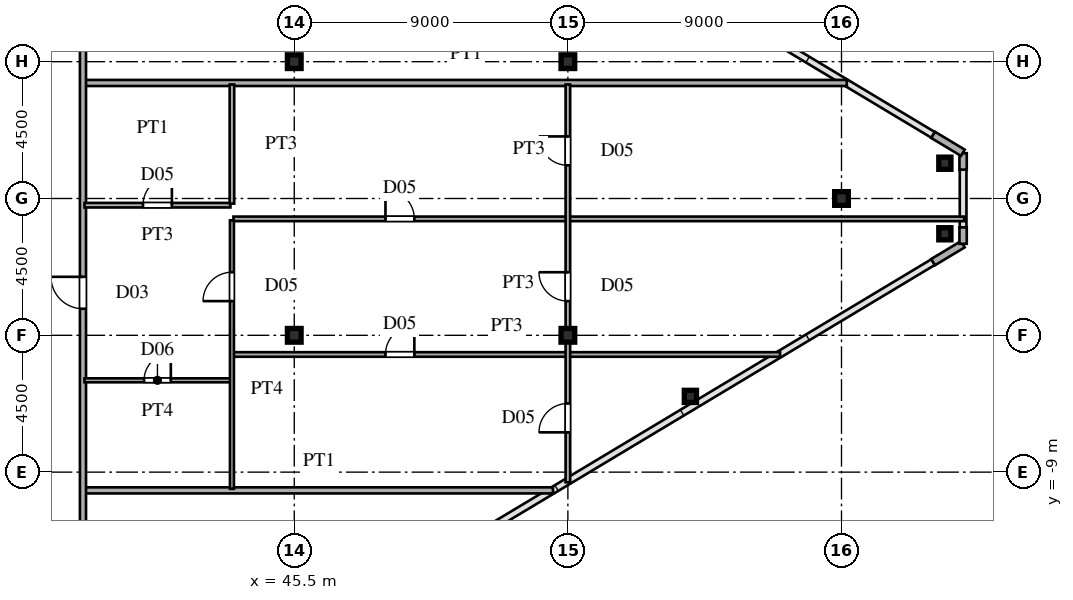
"""IFC4 building model, lengths in metres.
Left out: names, types, materials, properties, quantities, classifications, styles, units other than length and angle.
Written with IfcOpenShell. Run it as: python <this file> out.ifc"""

import sys

from ifc_helpers import new_model, si_unit, direction, frame, frame_2d, origin, origin_2d, place, context, subcontext, project, spatial, rectangle, hollow_rectangle, i_section, extrude, source, transform, mapped, element, fill, save


model = new_model("IFC4")
c1 = context("Model", 3, precision=1e-05, world=origin(), true_north=direction((0.0, 1.0)))
c2 = subcontext(c1, "Body", "Model", "MODEL_VIEW")
j1 = project(units=[si_unit("LENGTHUNIT", "METRE"), si_unit("PLANEANGLEUNIT", "RADIAN")], contexts=[c1])
p1 = place(None, origin())
s1 = spatial("IfcSite", under=j1, at=p1, CompositionType="ELEMENT")
p2 = place(p1, origin())
s2 = spatial("IfcBuilding", under=s1, at=p2, CompositionType="ELEMENT")
p3 = place(p2, frame((0.0, 0.0, 265.65)))
s3 = spatial("IfcBuildingStorey", under=s2, at=p3, CompositionType="ELEMENT", Elevation=265.65)
m1 = source(origin(), c2, "Body", "SweptSolid", [
    extrude(i_section(OverallWidth=0.45, OverallDepth=0.45, WebThickness=0.016, FlangeThickness=0.025, at=origin_2d()), origin(), (0.0, 0.0, 1.0), 3.75),
])
for number, where, z_axis, x_axis in (
    (1, (45.5, -4.5, 0.0), (0.0, 0.0, 1.0), (1.0, 0.0, 0.0)),
    (2, (45.5, 4.5, 0.0), (0.0, 0.0, 1.0), (1.0, 0.0, 0.0)),
    (3, (54.5, -4.5, 0.0), (0.0, 0.0, 1.0), (1.0, 0.0, 0.0)),
    (4, (54.5, 4.5, 0.0), (0.0, 0.0, 1.0), (1.0, 0.0, 0.0)),
    (5, (63.5, 0.0, 0.0), (0.0, 0.0, 1.0), (1.0, 0.0, 0.0)),
):
    element("IfcColumn", number, at=place(p3, frame(where, z_axis=z_axis, x_axis=x_axis)), inside=s3, PredefinedType="COLUMN", context=c2, shape_type="MappedRepresentation", body=[
        mapped(m1, transform((0.0, 0.0, 0.0), scale=1.0)),
    ])
m2 = source(origin(), c2, "Body", "SweptSolid", [
    extrude(hollow_rectangle(XDim=0.4, YDim=0.4, WallThickness=0.016, at=origin_2d()), origin(), (0.0, 0.0, 1.0), 3.75),
])
for number, where, z_axis, x_axis in (
    (6, (66.9, -1.16, 0.0), (0.0, 0.0, 1.0), (1.0, 0.0, 0.0)),
    (7, (66.9, 1.16, 0.0), (0.0, 0.0, 1.0), (1.0, 0.0, 0.0)),
    (8, (58.53, -6.509, 0.0), (0.0, 0.0, 1.0), (1.0, 0.0, 0.0)),
):
    element("IfcColumn", number, at=place(p3, frame(where, z_axis=z_axis, x_axis=x_axis)), inside=s3, PredefinedType="COLUMN", context=c2, shape_type="MappedRepresentation", body=[
        mapped(m2, transform((0.0, 0.0, 0.0), scale=1.0)),
    ])
p4 = place(p3, frame((66.514, -2.092, 0.0), z_axis=(0.0, 0.0, 1.0), x_axis=(0.85743623509, 0.514590228002, 0.0)))
e9 = element("IfcWall", 9, at=p4, inside=s3, PredefinedType="SOLIDWALL", context=c2, shape_type="SweptSolid", body=[
    extrude(rectangle(XDim=1.14, YDim=0.24, at=frame_2d((0.57, 0.0))), origin(), (0.0, 0.0, 1.0), 3.49),
])
for number, where, z_axis, x_axis in (
    (10, (67.5, -1.49, 0.0), (0.0, 0.0, 1.0), (0.0, 1.0, 0.0)),
    (11, (67.5, 0.95, 0.0), (0.0, 0.0, 1.0), (0.0, 1.0, 0.0)),
):
    element("IfcWall", number, at=place(p3, frame(where, z_axis=z_axis, x_axis=x_axis)), inside=s3, PredefinedType="SOLIDWALL", context=c2, shape_type="SweptSolid", body=[
        extrude(rectangle(XDim=0.54, YDim=0.24, at=frame_2d((0.27, 0.0))), origin(), (0.0, 0.0, 1.0), 3.49),
    ])
p5 = place(p3, frame((67.491, 1.505, 0.0), z_axis=(0.0, 0.0, 1.0), x_axis=(-0.85743623509, 0.514590228002, 0.0)))
e12 = element("IfcWall", 12, at=p5, inside=s3, PredefinedType="SOLIDWALL", context=c2, shape_type="SweptSolid", body=[
    extrude(rectangle(XDim=1.14, YDim=0.24, at=frame_2d((0.57, 0.0))), origin(), (0.0, 0.0, 1.0), 3.49),
])
p6 = place(p3, frame((38.63, -9.6, 0.0), z_axis=(0.0, 0.0, 1.0), x_axis=(1.0, 0.0, 0.0)))
e13 = element("IfcWall", 13, at=p6, inside=s3, PredefinedType="PARTITIONING", context=c2, shape_type="SweptSolid", body=[
    extrude(rectangle(XDim=15.38, YDim=0.2, at=frame_2d((7.69, 0.0))), origin(), (0.0, 0.0, 1.0), 3.49),
])
p7 = place(p3, frame((38.6, -5.98, 0.0), z_axis=(0.0, 0.0, 1.0), x_axis=(1.0, 0.0, 0.0)))
e14 = element("IfcWall", 14, at=p7, inside=s3, PredefinedType="PARTITIONING", context=c2, shape_type="SweptSolid", body=[
    extrude(rectangle(XDim=4.8, YDim=0.13, at=frame_2d((2.4, 0.0))), origin(), (0.0, 0.0, 1.0), 3.49),
])
p8 = place(p7, frame((1.96, 0.0, 0.0)))
e15 = element("IfcOpeningElement", 15, at=p8, cuts=e14, PredefinedType="OPENING", context=c2, shape_type="SweptSolid", body=[
    extrude(rectangle(XDim=0.88, YDim=2.1, at=frame_2d((0.44, 1.05))), frame((0.0, 0.075, 0.0), z_axis=(0.0, -1.0, 0.0), x_axis=(1.0, 0.0, 0.0)), (0.0, 0.0, 1.0), 0.15),
])
p9 = place(p3, frame((43.5, -5.13, 0.0), z_axis=(0.0, 0.0, 1.0), x_axis=(1.0, 0.0, 0.0)))
e16 = element("IfcWall", 16, at=p9, inside=s3, PredefinedType="PARTITIONING", context=c2, shape_type="SweptSolid", body=[
    extrude(rectangle(XDim=17.98, YDim=0.15, at=frame_2d((8.99, 0.0))), origin(), (0.0, 0.0, 1.0), 3.49),
])
p10 = place(p9, frame((5.0, 0.0, 0.0)))
e17 = element("IfcOpeningElement", 17, at=p10, cuts=e16, PredefinedType="OPENING", context=c2, shape_type="SweptSolid", body=[
    extrude(rectangle(XDim=0.95, YDim=2.15, at=frame_2d((0.475, 1.075))), frame((0.0, 0.085, 0.0), z_axis=(0.0, -1.0, 0.0), x_axis=(1.0, 0.0, 0.0)), (0.0, 0.0, 1.0), 0.17),
])
p11 = place(p3, frame((43.5, -0.67, 0.0), z_axis=(0.0, 0.0, 1.0), x_axis=(1.0, 0.0, 0.0)))
e18 = element("IfcWall", 18, at=p11, inside=s3, PredefinedType="PARTITIONING", context=c2, shape_type="SweptSolid", body=[
    extrude(rectangle(XDim=24.035, YDim=0.15, at=frame_2d((12.018, 0.0))), origin(), (0.0, 0.0, 1.0), 3.49),
])
p12 = place(p11, frame((5.0, 0.0, 0.0)))
e19 = element("IfcOpeningElement", 19, at=p12, cuts=e18, PredefinedType="OPENING", context=c2, shape_type="SweptSolid", body=[
    extrude(rectangle(XDim=0.95, YDim=2.15, at=frame_2d((0.475, 1.075))), frame((0.0, 0.085, 0.0), z_axis=(0.0, -1.0, 0.0), x_axis=(1.0, 0.0, 0.0)), (0.0, 0.0, 1.0), 0.17),
])
p13 = place(p3, frame((38.6, -0.22, 0.0), z_axis=(0.0, 0.0, 1.0), x_axis=(1.0, 0.0, 0.0)))
e20 = element("IfcWall", 20, at=p13, inside=s3, PredefinedType="PARTITIONING", context=c2, shape_type="SweptSolid", body=[
    extrude(rectangle(XDim=4.8, YDim=0.15, at=frame_2d((2.4, 0.0))), origin(), (0.0, 0.0, 1.0), 3.49),
])
p14 = place(p13, frame((1.925, 0.0, 0.0)))
e21 = element("IfcOpeningElement", 21, at=p14, cuts=e20, PredefinedType="OPENING", context=c2, shape_type="SweptSolid", body=[
    extrude(rectangle(XDim=0.95, YDim=2.15, at=frame_2d((0.475, 1.075))), frame((0.0, 0.085, 0.0), z_axis=(0.0, -1.0, 0.0), x_axis=(1.0, 0.0, 0.0)), (0.0, 0.0, 1.0), 0.17),
])
p15 = place(p3, frame((38.63, 3.8, 0.0), z_axis=(0.0, 0.0, 1.0), x_axis=(1.0, 0.0, 0.0)))
e22 = element("IfcWall", 22, at=p15, inside=s3, PredefinedType="PARTITIONING", context=c2, shape_type="SweptSolid", body=[
    extrude(rectangle(XDim=25.046, YDim=0.2, at=frame_2d((12.523, 0.0))), origin(), (0.0, 0.0, 1.0), 3.49),
])
p16 = place(p3, frame((38.55, -15.515, 0.0), z_axis=(0.0, 0.0, 1.0), x_axis=(0.0, 1.0, 0.0)))
e23 = element("IfcWall", 23, at=p16, inside=s3, PredefinedType="PARTITIONING", context=c2, shape_type="SweptSolid", body=[
    extrude(rectangle(XDim=31.03, YDim=0.2, at=frame_2d((15.515, 0.0))), origin(), (0.0, 0.0, 1.0), 3.49),
])
p17 = place(p16, frame((2.39, 0.0, 0.0)))
e24 = element("IfcOpeningElement", 24, at=p17, cuts=e23, PredefinedType="OPENING", context=c2, shape_type="SweptSolid", body=[
    extrude(rectangle(XDim=1.05, YDim=2.25, at=frame_2d((0.525, 1.125))), frame((0.0, 0.11, 0.0), z_axis=(0.0, -1.0, 0.0), x_axis=(1.0, 0.0, 0.0)), (0.0, 0.0, 1.0), 0.22),
])
p18 = place(p16, frame((11.889, 0.0, 0.0)))
e25 = element("IfcOpeningElement", 25, at=p18, cuts=e23, PredefinedType="OPENING", context=c2, shape_type="SweptSolid", body=[
    extrude(rectangle(XDim=1.05, YDim=2.25, at=frame_2d((0.525, 1.125))), frame((0.0, 0.11, 0.0), z_axis=(0.0, -1.0, 0.0), x_axis=(1.0, 0.0, 0.0)), (0.0, 0.0, 1.0), 0.22),
])
p19 = place(p16, frame((24.69, 0.0, 0.0)))
e26 = element("IfcOpeningElement", 26, at=p19, cuts=e23, PredefinedType="OPENING", context=c2, shape_type="SweptSolid", body=[
    extrude(rectangle(XDim=1.05, YDim=2.25, at=frame_2d((0.525, 1.125))), frame((0.0, 0.11, 0.0), z_axis=(0.0, -1.0, 0.0), x_axis=(1.0, 0.0, 0.0)), (0.0, 0.0, 1.0), 0.22),
])
p20 = place(p3, frame((43.45, -9.55, 0.0), z_axis=(0.0, 0.0, 1.0), x_axis=(0.0, 1.0, 0.0)))
e27 = element("IfcWall", 27, at=p20, inside=s3, PredefinedType="PARTITIONING", context=c2, shape_type="SweptSolid", body=[
    extrude(rectangle(XDim=8.833, YDim=0.13, at=frame_2d((4.417, 0.0))), origin(), (0.0, 0.0, 1.0), 3.49),
])
p21 = place(p20, frame((6.175, 0.0, 0.0)))
e28 = element("IfcOpeningElement", 28, at=p21, cuts=e27, PredefinedType="OPENING", context=c2, shape_type="SweptSolid", body=[
    extrude(rectangle(XDim=0.95, YDim=2.15, at=frame_2d((0.475, 1.075))), frame((0.0, 0.075, 0.0), z_axis=(0.0, -1.0, 0.0), x_axis=(1.0, 0.0, 0.0)), (0.0, 0.0, 1.0), 0.15),
])
p22 = place(p3, frame((43.45, -0.168, 0.0), z_axis=(0.0, 0.0, 1.0), x_axis=(0.0, 1.0, 0.0)))
e29 = element("IfcWall", 29, at=p22, inside=s3, PredefinedType="PARTITIONING", context=c2, shape_type="SweptSolid", body=[
    extrude(rectangle(XDim=3.918, YDim=0.15, at=frame_2d((1.959, 0.0))), origin(), (0.0, 0.0, 1.0), 3.49),
])
p23 = place(p3, frame((54.5, -9.335, 0.0), z_axis=(0.0, 0.0, 1.0), x_axis=(0.0, 1.0, 0.0)))
e30 = element("IfcWall", 30, at=p23, inside=s3, PredefinedType="PARTITIONING", context=c2, shape_type="SweptSolid", body=[
    extrude(rectangle(XDim=13.085, YDim=0.15, at=frame_2d((6.542, 0.0))), origin(), (0.0, 0.0, 1.0), 2.89),
])
p24 = place(p23, frame((5.96, 0.0, 0.0)))
e31 = element("IfcOpeningElement", 31, at=p24, cuts=e30, PredefinedType="OPENING", context=c2, shape_type="SweptSolid", body=[
    extrude(rectangle(XDim=0.95, YDim=2.15, at=frame_2d((0.475, 1.075))), frame((0.0, 0.085, 0.0), z_axis=(0.0, -1.0, 0.0), x_axis=(1.0, 0.0, 0.0)), (0.0, 0.0, 1.0), 0.17),
])
p25 = place(p23, frame((1.643, 0.0, 0.0)))
e32 = element("IfcOpeningElement", 32, at=p25, cuts=e30, PredefinedType="OPENING", context=c2, shape_type="SweptSolid", body=[
    extrude(rectangle(XDim=0.95, YDim=2.15, at=frame_2d((0.475, 1.075))), frame((0.0, 0.085, 0.0), z_axis=(0.0, -1.0, 0.0), x_axis=(1.0, 0.0, 0.0)), (0.0, 0.0, 1.0), 0.17),
])
p26 = place(p23, frame((10.427, 0.0, 0.0)))
e33 = element("IfcOpeningElement", 33, at=p26, cuts=e30, PredefinedType="OPENING", context=c2, shape_type="SweptSolid", body=[
    extrude(rectangle(XDim=0.95, YDim=2.15, at=frame_2d((0.475, 1.075))), frame((0.0, 0.085, 0.0), z_axis=(0.0, -1.0, 0.0), x_axis=(1.0, 0.0, 0.0)), (0.0, 0.0, 1.0), 0.17),
])
m3 = source(origin(), c2, "Body", "SweptSolid", [
    extrude(rectangle(XDim=0.88, YDim=2.1, at=frame_2d((0.44, 1.05))), frame((0.0, 0.025, 0.0), z_axis=(0.0, -1.0, 0.0), x_axis=(1.0, 0.0, 0.0)), (0.0, 0.0, 1.0), 0.05),
])
p27 = place(p8, origin())
e34 = element("IfcDoor", 34, at=p27, inside=s3, OperationType="SINGLE_SWING_RIGHT", PredefinedType="DOOR", context=c2, shape_type="MappedRepresentation", body=[
    mapped(m3, transform((0.0, 0.0, 0.0), scale=1.0)),
])
fill(e15, e34)
m4 = source(origin(), c2, "Body", "SweptSolid", [
    extrude(rectangle(XDim=0.95, YDim=2.15, at=frame_2d((0.475, 1.075))), frame((0.0, 0.025, 0.0), z_axis=(0.0, -1.0, 0.0), x_axis=(1.0, 0.0, 0.0)), (0.0, 0.0, 1.0), 0.05),
])
p28 = place(p10, origin())
e35 = element("IfcDoor", 35, at=p28, inside=s3, OperationType="SINGLE_SWING_RIGHT", PredefinedType="DOOR", context=c2, shape_type="MappedRepresentation", body=[
    mapped(m4, transform((0.0, 0.0, 0.0), scale=1.0)),
])
fill(e17, e35)
p29 = place(p12, origin())
e36 = element("IfcDoor", 36, at=p29, inside=s3, OperationType="SINGLE_SWING_LEFT", PredefinedType="DOOR", context=c2, shape_type="MappedRepresentation", body=[
    mapped(m4, transform((0.0, 0.0, 0.0), scale=1.0)),
])
fill(e19, e36)
p30 = place(p14, origin())
e37 = element("IfcDoor", 37, at=p30, inside=s3, OperationType="SINGLE_SWING_RIGHT", PredefinedType="DOOR", context=c2, shape_type="MappedRepresentation", body=[
    mapped(m4, transform((0.0, 0.0, 0.0), scale=1.0)),
])
fill(e21, e37)
m5 = source(origin(), c2, "Body", "SweptSolid", [
    extrude(rectangle(XDim=1.05, YDim=2.25, at=frame_2d((0.525, 1.125))), frame((0.0, 0.025, 0.0), z_axis=(0.0, -1.0, 0.0), x_axis=(1.0, 0.0, 0.0)), (0.0, 0.0, 1.0), 0.05),
])
p31 = place(p18, origin())
e38 = element("IfcDoor", 38, at=p31, inside=s3, OperationType="SINGLE_SWING_RIGHT", PredefinedType="DOOR", context=c2, shape_type="MappedRepresentation", body=[
    mapped(m5, transform((0.0, 0.0, 0.0), scale=1.0)),
])
fill(e25, e38)
p32 = place(p21, origin())
e39 = element("IfcDoor", 39, at=p32, inside=s3, OperationType="SINGLE_SWING_LEFT", PredefinedType="DOOR", context=c2, shape_type="MappedRepresentation", body=[
    mapped(m4, transform((0.0, 0.0, 0.0), scale=1.0)),
])
fill(e28, e39)
p33 = place(p24, origin())
e40 = element("IfcDoor", 40, at=p33, inside=s3, OperationType="SINGLE_SWING_RIGHT", PredefinedType="DOOR", context=c2, shape_type="MappedRepresentation", body=[
    mapped(m4, transform((0.0, 0.0, 0.0), scale=1.0)),
])
fill(e31, e40)
p34 = place(p25, origin())
e41 = element("IfcDoor", 41, at=p34, inside=s3, OperationType="SINGLE_SWING_LEFT", PredefinedType="DOOR", context=c2, shape_type="MappedRepresentation", body=[
    mapped(m4, transform((0.0, 0.0, 0.0), scale=1.0)),
])
fill(e32, e41)
p35 = place(p26, origin())
e42 = element("IfcDoor", 42, at=p35, inside=s3, OperationType="SINGLE_SWING_RIGHT", PredefinedType="DOOR", context=c2, shape_type="MappedRepresentation", body=[
    mapped(m4, transform((0.0, 0.0, 0.0), scale=1.0)),
])
fill(e33, e42)
save(model, sys.argv[1])
